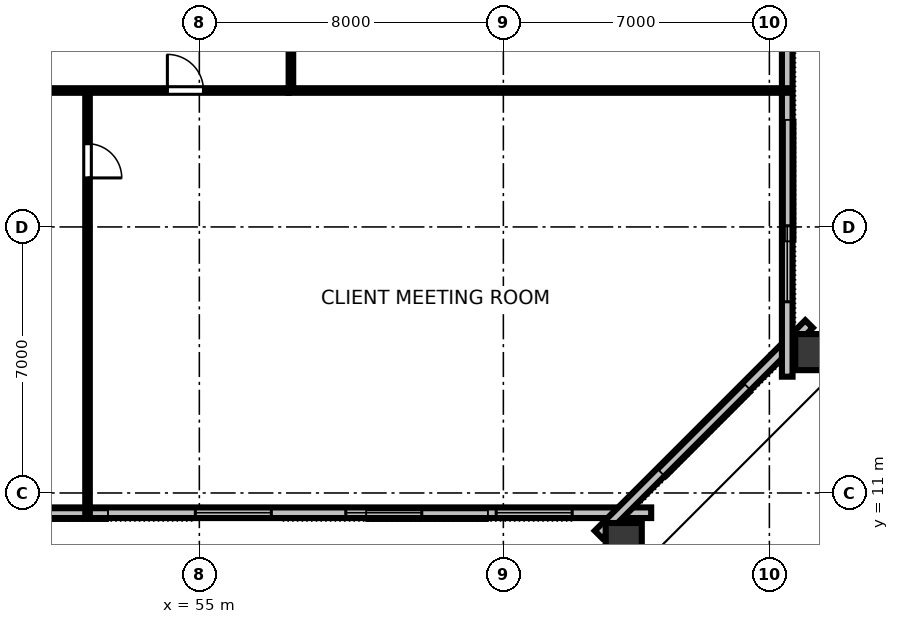
"""IFC4 building model, lengths in metres.
Left out: names, types, materials, properties, quantities, classifications, styles, units other than length and angle.
Written with IfcOpenShell. Run it as: python <this file> out.ifc"""

import sys

from ifc_helpers import new_model, si_unit, direction, frame, frame_2d, origin, origin_2d, place, context, subcontext, project, spatial, rectangle, hollow_rectangle, extrude, element, fill, save


model = new_model("IFC4")
c1 = context("Model", 3, precision=1e-05, world=origin(), true_north=direction((0.0, 1.0)))
c2 = subcontext(c1, "Body", "Model", "MODEL_VIEW")
j1 = project(units=[si_unit("LENGTHUNIT", "METRE"), si_unit("PLANEANGLEUNIT", "RADIAN")], contexts=[c1])
p1 = place(None, origin())
s1 = spatial("IfcSite", under=j1, at=p1, CompositionType="ELEMENT")
p2 = place(p1, origin())
s2 = spatial("IfcBuilding", under=s1, at=p2, CompositionType="ELEMENT")
p3 = place(p2, frame((0.0, 0.0, 67.6)))
s3 = spatial("IfcBuildingStorey", under=s2, at=p3, CompositionType="ELEMENT", Elevation=67.6)
p4 = place(p3, frame((66.168, 9.635, 0.0), z_axis=(0.044927645815, -0.088480693771, 0.995064155455), x_axis=(0.891639602851, 0.452745865389, 0.0)))
e1 = element("IfcColumn", 1, at=p4, inside=s3, PredefinedType="COLUMN", context=c2, shape_type="SweptSolid", body=[
    extrude(hollow_rectangle(XDim=0.95, YDim=1.15, WallThickness=0.06, at=origin_2d()), origin(), (0.0, 0.0, 1.0), 3.375),
])
p5 = place(p3, frame((71.256, 14.707, 0.0), z_axis=(0.103221863164, -0.030287087301, 0.994197133021), x_axis=(-0.953979075254, 0.279914028383, 0.107573512968)))
e2 = element("IfcColumn", 2, at=p5, inside=s3, PredefinedType="COLUMN", context=c2, shape_type="SweptSolid", body=[
    extrude(hollow_rectangle(XDim=0.95, YDim=1.15, WallThickness=0.06, at=origin_2d()), origin(), (0.0, 0.0, 1.0), 3.377),
])
p6 = place(p3, frame((25.11, 10.48, 0.0), z_axis=(0.0, 0.0, 1.0), x_axis=(1.0, 0.0, 0.0)))
e3 = element("IfcWall", 3, at=p6, inside=s3, PredefinedType="STANDARD", context=c2, shape_type="SweptSolid", body=[
    extrude(rectangle(XDim=41.78, YDim=0.28, at=frame_2d((20.89, 0.0))), origin(), (0.0, 0.0, 1.0), 3.36),
])
p7 = place(p6, frame((2.079, 0.0, 0.8)))
e4 = element("IfcOpeningElement", 4, at=p7, cuts=e3, PredefinedType="OPENING", context=c2, shape_type="SweptSolid", body=[
    extrude(rectangle(XDim=2.0, YDim=1.95, at=frame_2d((1.0, 0.975))), frame((0.0, 0.15, 0.0), z_axis=(0.0, -1.0, 0.0), x_axis=(1.0, 0.0, 0.0)), (0.0, 0.0, 1.0), 0.3),
])
p8 = place(p6, frame((6.037, 0.0, 0.8)))
e5 = element("IfcOpeningElement", 5, at=p8, cuts=e3, PredefinedType="OPENING", context=c2, shape_type="SweptSolid", body=[
    extrude(rectangle(XDim=2.0, YDim=1.95, at=frame_2d((1.0, 0.975))), frame((0.0, 0.15, 0.0), z_axis=(0.0, -1.0, 0.0), x_axis=(1.0, 0.0, 0.0)), (0.0, 0.0, 1.0), 0.3),
])
p9 = place(p6, frame((9.995, 0.0, 0.8)))
e6 = element("IfcOpeningElement", 6, at=p9, cuts=e3, PredefinedType="OPENING", context=c2, shape_type="SweptSolid", body=[
    extrude(rectangle(XDim=2.0, YDim=1.95, at=frame_2d((1.0, 0.975))), frame((0.0, 0.15, 0.0), z_axis=(0.0, -1.0, 0.0), x_axis=(1.0, 0.0, 0.0)), (0.0, 0.0, 1.0), 0.3),
])
p10 = place(p6, frame((13.953, 0.0, 0.8)))
e7 = element("IfcOpeningElement", 7, at=p10, cuts=e3, PredefinedType="OPENING", context=c2, shape_type="SweptSolid", body=[
    extrude(rectangle(XDim=2.0, YDim=1.95, at=frame_2d((1.0, 0.975))), frame((0.0, 0.15, 0.0), z_axis=(0.0, -1.0, 0.0), x_axis=(1.0, 0.0, 0.0)), (0.0, 0.0, 1.0), 0.3),
])
p11 = place(p6, frame((17.911, 0.0, 0.8)))
e8 = element("IfcOpeningElement", 8, at=p11, cuts=e3, PredefinedType="OPENING", context=c2, shape_type="SweptSolid", body=[
    extrude(rectangle(XDim=2.0, YDim=1.95, at=frame_2d((1.0, 0.975))), frame((0.0, 0.15, 0.0), z_axis=(0.0, -1.0, 0.0), x_axis=(1.0, 0.0, 0.0)), (0.0, 0.0, 1.0), 0.3),
])
p12 = place(p6, frame((21.869, 0.0, 0.8)))
e9 = element("IfcOpeningElement", 9, at=p12, cuts=e3, PredefinedType="OPENING", context=c2, shape_type="SweptSolid", body=[
    extrude(rectangle(XDim=2.0, YDim=1.95, at=frame_2d((1.0, 0.975))), frame((0.0, 0.15, 0.0), z_axis=(0.0, -1.0, 0.0), x_axis=(1.0, 0.0, 0.0)), (0.0, 0.0, 1.0), 0.3),
])
p13 = place(p6, frame((29.785, 0.0, 0.8)))
e10 = element("IfcOpeningElement", 10, at=p13, cuts=e3, PredefinedType="OPENING", context=c2, shape_type="SweptSolid", body=[
    extrude(rectangle(XDim=2.0, YDim=1.95, at=frame_2d((1.0, 0.975))), frame((0.0, 0.15, 0.0), z_axis=(0.0, -1.0, 0.0), x_axis=(1.0, 0.0, 0.0)), (0.0, 0.0, 1.0), 0.3),
])
p14 = place(p6, frame((33.743, 0.0, 0.8)))
e11 = element("IfcOpeningElement", 11, at=p14, cuts=e3, PredefinedType="OPENING", context=c2, shape_type="SweptSolid", body=[
    extrude(rectangle(XDim=2.0, YDim=1.95, at=frame_2d((1.0, 0.975))), frame((0.0, 0.15, 0.0), z_axis=(0.0, -1.0, 0.0), x_axis=(1.0, 0.0, 0.0)), (0.0, 0.0, 1.0), 0.3),
])
p15 = place(p6, frame((37.701, 0.0, 0.8)))
e12 = element("IfcOpeningElement", 12, at=p15, cuts=e3, PredefinedType="OPENING", context=c2, shape_type="SweptSolid", body=[
    extrude(rectangle(XDim=2.0, YDim=1.95, at=frame_2d((1.0, 0.975))), frame((0.0, 0.15, 0.0), z_axis=(0.0, -1.0, 0.0), x_axis=(1.0, 0.0, 0.0)), (0.0, 0.0, 1.0), 0.3),
])
p16 = place(p3, frame((65.504, 9.906, 0.0), z_axis=(0.0, 0.0, 1.0), x_axis=(0.707106781187, 0.707106781187, 0.0)))
e13 = element("IfcWall", 13, at=p16, inside=s3, PredefinedType="STANDARD", context=c2, shape_type="SweptSolid", body=[
    extrude(rectangle(XDim=7.834, YDim=0.28, at=frame_2d((3.917, 0.0))), origin(), (0.0, 0.0, 1.0), 3.36),
])
p17 = place(p3, frame((70.47, 14.06, 0.0), z_axis=(0.0, 0.0, 1.0), x_axis=(0.0, 1.0, 0.0)))
e14 = element("IfcWall", 14, at=p17, inside=s3, PredefinedType="STANDARD", context=c2, shape_type="SweptSolid", body=[
    extrude(rectangle(XDim=35.88, YDim=0.28, at=frame_2d((17.94, 0.0))), origin(), (0.0, 0.0, 1.0), 3.36),
])
p18 = place(p17, frame((19.29, 0.0, 0.0)))
e15 = element("IfcOpeningElement", 15, at=p18, cuts=e14, PredefinedType="OPENING", context=c2, shape_type="SweptSolid", body=[
    extrude(rectangle(XDim=1.4, YDim=2.15, at=frame_2d((0.7, 1.075))), frame((0.0, 0.15, 0.0), z_axis=(0.0, -1.0, 0.0), x_axis=(1.0, 0.0, 0.0)), (0.0, 0.0, 1.0), 0.3),
])
p19 = place(p17, frame((1.971, 0.0, 0.8)))
e16 = element("IfcOpeningElement", 16, at=p19, cuts=e14, PredefinedType="OPENING", context=c2, shape_type="SweptSolid", body=[
    extrude(rectangle(XDim=2.0, YDim=1.95, at=frame_2d((1.0, 0.975))), frame((0.0, 0.15, 0.0), z_axis=(0.0, -1.0, 0.0), x_axis=(1.0, 0.0, 0.0)), (0.0, 0.0, 1.0), 0.3),
])
p20 = place(p17, frame((9.456, 0.0, 0.8)))
e17 = element("IfcOpeningElement", 17, at=p20, cuts=e14, PredefinedType="OPENING", context=c2, shape_type="SweptSolid", body=[
    extrude(rectangle(XDim=2.0, YDim=1.95, at=frame_2d((1.0, 0.975))), frame((0.0, 0.15, 0.0), z_axis=(0.0, -1.0, 0.0), x_axis=(1.0, 0.0, 0.0)), (0.0, 0.0, 1.0), 0.3),
])
p21 = place(p17, frame((24.424, 0.0, 0.8)))
e18 = element("IfcOpeningElement", 18, at=p21, cuts=e14, PredefinedType="OPENING", context=c2, shape_type="SweptSolid", body=[
    extrude(rectangle(XDim=2.0, YDim=1.95, at=frame_2d((1.0, 0.975))), frame((0.0, 0.15, 0.0), z_axis=(0.0, -1.0, 0.0), x_axis=(1.0, 0.0, 0.0)), (0.0, 0.0, 1.0), 0.3),
])
p22 = place(p17, frame((31.909, 0.0, 0.8)))
e19 = element("IfcOpeningElement", 19, at=p22, cuts=e14, PredefinedType="OPENING", context=c2, shape_type="SweptSolid", body=[
    extrude(rectangle(XDim=2.0, YDim=1.95, at=frame_2d((1.0, 0.975))), frame((0.0, 0.15, 0.0), z_axis=(0.0, -1.0, 0.0), x_axis=(1.0, 0.0, 0.0)), (0.0, 0.0, 1.0), 0.3),
])
p23 = place(p3, frame((52.058, 21.59, 0.0), z_axis=(0.0, 0.0, 1.0), x_axis=(0.0, -1.0, 0.0)))
e20 = element("IfcWall", 20, at=p23, inside=s3, PredefinedType="PARTITIONING", context=c2, shape_type="SweptSolid", body=[
    extrude(rectangle(XDim=11.11, YDim=0.12, at=frame_2d((5.555, 0.0))), origin(), (0.0, 0.0, 1.0), 2.64),
])
p24 = place(p23, frame((1.4, 0.0, 0.0)))
e21 = element("IfcOpeningElement", 21, at=p24, cuts=e20, PredefinedType="OPENING", context=c2, shape_type="SweptSolid", body=[
    extrude(rectangle(XDim=0.9, YDim=2.15, at=frame_2d((0.45, 1.075))), frame((0.0, 0.07, 0.0), z_axis=(0.0, -1.0, 0.0), x_axis=(1.0, 0.0, 0.0)), (0.0, 0.0, 1.0), 0.14),
])
p25 = place(p3, frame((34.65, 21.59, 0.0), z_axis=(0.0, 0.0, 1.0), x_axis=(1.0, 0.0, 0.0)))
e22 = element("IfcWall", 22, at=p25, inside=s3, PredefinedType="PARTITIONING", context=c2, shape_type="SweptSolid", body=[
    extrude(rectangle(XDim=22.7, YDim=0.12, at=frame_2d((11.35, 0.0))), origin(), (0.0, 0.0, 1.0), 2.64),
])
p26 = place(p25, frame((3.365, 0.0, 0.0)))
e23 = element("IfcOpeningElement", 23, at=p26, cuts=e22, PredefinedType="OPENING", context=c2, shape_type="SweptSolid", body=[
    extrude(rectangle(XDim=0.95, YDim=2.15, at=frame_2d((0.475, 1.075))), frame((0.0, 0.07, 0.0), z_axis=(0.0, -1.0, 0.0), x_axis=(1.0, 0.0, 0.0)), (0.0, 0.0, 1.0), 0.14),
])
p27 = place(p25, frame((8.718, 0.0, 0.0)))
e24 = element("IfcOpeningElement", 24, at=p27, cuts=e22, PredefinedType="OPENING", context=c2, shape_type="SweptSolid", body=[
    extrude(rectangle(XDim=0.95, YDim=2.15, at=frame_2d((0.475, 1.075))), frame((0.0, 0.07, 0.0), z_axis=(0.0, -1.0, 0.0), x_axis=(1.0, 0.0, 0.0)), (0.0, 0.0, 1.0), 0.14),
])
p28 = place(p25, frame((13.651, 0.0, 0.0)))
e25 = element("IfcOpeningElement", 25, at=p28, cuts=e22, PredefinedType="OPENING", context=c2, shape_type="SweptSolid", body=[
    extrude(rectangle(XDim=0.95, YDim=2.15, at=frame_2d((0.475, 1.075))), frame((0.0, 0.07, 0.0), z_axis=(0.0, -1.0, 0.0), x_axis=(1.0, 0.0, 0.0)), (0.0, 0.0, 1.0), 0.14),
])
p29 = place(p25, frame((19.509, 0.0, 0.0)))
e26 = element("IfcOpeningElement", 26, at=p29, cuts=e22, PredefinedType="OPENING", context=c2, shape_type="SweptSolid", body=[
    extrude(rectangle(XDim=0.95, YDim=2.15, at=frame_2d((0.475, 1.075))), frame((0.0, 0.07, 0.0), z_axis=(0.0, -1.0, 0.0), x_axis=(1.0, 0.0, 0.0)), (0.0, 0.0, 1.0), 0.14),
])
p30 = place(p3, frame((57.41, 21.65, 0.0), z_axis=(0.0, 0.0, 1.0), x_axis=(0.0, 1.0, 0.0)))
e27 = element("IfcWall", 27, at=p30, inside=s3, PredefinedType="PARTITIONING", context=c2, shape_type="SweptSolid", body=[
    extrude(rectangle(XDim=20.7, YDim=0.12, at=frame_2d((10.35, 0.0))), origin(), (0.0, 0.0, 1.0), 2.64),
])
p31 = place(p30, frame((3.502, 0.0, 0.0)))
e28 = element("IfcOpeningElement", 28, at=p31, cuts=e27, PredefinedType="OPENING", context=c2, shape_type="SweptSolid", body=[
    extrude(rectangle(XDim=0.95, YDim=2.15, at=frame_2d((0.475, 1.075))), frame((0.0, 0.07, 0.0), z_axis=(0.0, -1.0, 0.0), x_axis=(1.0, 0.0, 0.0)), (0.0, 0.0, 1.0), 0.14),
])
p32 = place(p30, frame((13.652, 0.0, 0.0)))
e29 = element("IfcOpeningElement", 29, at=p32, cuts=e27, PredefinedType="OPENING", context=c2, shape_type="SweptSolid", body=[
    extrude(rectangle(XDim=0.95, YDim=2.15, at=frame_2d((0.475, 1.075))), frame((0.0, 0.07, 0.0), z_axis=(0.0, -1.0, 0.0), x_axis=(1.0, 0.0, 0.0)), (0.0, 0.0, 1.0), 0.14),
])
p33 = place(p3, frame((57.35, 21.59, 0.0), z_axis=(0.0, 0.0, 1.0), x_axis=(1.0, 0.0, 0.0)))
e30 = element("IfcWall", 30, at=p33, inside=s3, PredefinedType="PARTITIONING", context=c2, shape_type="SweptSolid", body=[
    extrude(rectangle(XDim=13.12, YDim=0.12, at=frame_2d((6.56, 0.0))), origin(), (0.0, 0.0, 1.0), 2.64),
])
p34 = place(p13, origin())
e31 = element("IfcWindow", 31, at=p34, inside=s3, PartitioningType="SINGLE_PANEL", PredefinedType="WINDOW", context=c2, shape_type="SweptSolid", body=[
    extrude(rectangle(XDim=2.0, YDim=1.95, at=frame_2d((1.0, 0.975))), frame((0.0, 0.03, 0.0), z_axis=(0.0, -1.0, 0.0), x_axis=(1.0, 0.0, 0.0)), (0.0, 0.0, 1.0), 0.06),
])
fill(e10, e31)
p35 = place(p14, origin())
e32 = element("IfcWindow", 32, at=p35, inside=s3, PartitioningType="SINGLE_PANEL", PredefinedType="WINDOW", context=c2, shape_type="SweptSolid", body=[
    extrude(rectangle(XDim=2.0, YDim=1.95, at=frame_2d((1.0, 0.975))), frame((0.0, 0.03, 0.0), z_axis=(0.0, -1.0, 0.0), x_axis=(1.0, 0.0, 0.0)), (0.0, 0.0, 1.0), 0.06),
])
fill(e11, e32)
p36 = place(p15, origin())
e33 = element("IfcWindow", 33, at=p36, inside=s3, PartitioningType="SINGLE_PANEL", PredefinedType="WINDOW", context=c2, shape_type="SweptSolid", body=[
    extrude(rectangle(XDim=2.0, YDim=1.95, at=frame_2d((1.0, 0.975))), frame((0.0, 0.03, 0.0), z_axis=(0.0, -1.0, 0.0), x_axis=(1.0, 0.0, 0.0)), (0.0, 0.0, 1.0), 0.06),
])
fill(e12, e33)
p37 = place(p19, origin())
e34 = element("IfcWindow", 34, at=p37, inside=s3, PartitioningType="SINGLE_PANEL", PredefinedType="WINDOW", context=c2, shape_type="SweptSolid", body=[
    extrude(rectangle(XDim=2.0, YDim=1.95, at=frame_2d((1.0, 0.975))), frame((0.0, 0.03, 0.0), z_axis=(0.0, -1.0, 0.0), x_axis=(1.0, 0.0, 0.0)), (0.0, 0.0, 1.0), 0.06),
])
fill(e16, e34)
p38 = place(p24, origin())
e35 = element("IfcDoor", 35, at=p38, inside=s3, OperationType="SINGLE_SWING_RIGHT", PredefinedType="DOOR", context=c2, shape_type="SweptSolid", body=[
    extrude(rectangle(XDim=0.9, YDim=2.15, at=frame_2d((0.45, 1.075))), frame((0.0, 0.025, 0.0), z_axis=(0.0, -1.0, 0.0), x_axis=(1.0, 0.0, 0.0)), (0.0, 0.0, 1.0), 0.05),
])
fill(e21, e35)
p39 = place(p29, origin())
e36 = element("IfcDoor", 36, at=p39, inside=s3, OperationType="SINGLE_SWING_LEFT", PredefinedType="DOOR", context=c2, shape_type="SweptSolid", body=[
    extrude(rectangle(XDim=0.95, YDim=2.15, at=frame_2d((0.475, 1.075))), frame((0.0, 0.025, 0.0), z_axis=(0.0, -1.0, 0.0), x_axis=(1.0, 0.0, 0.0)), (0.0, 0.0, 1.0), 0.05),
])
fill(e26, e36)
save(model, sys.argv[1])
